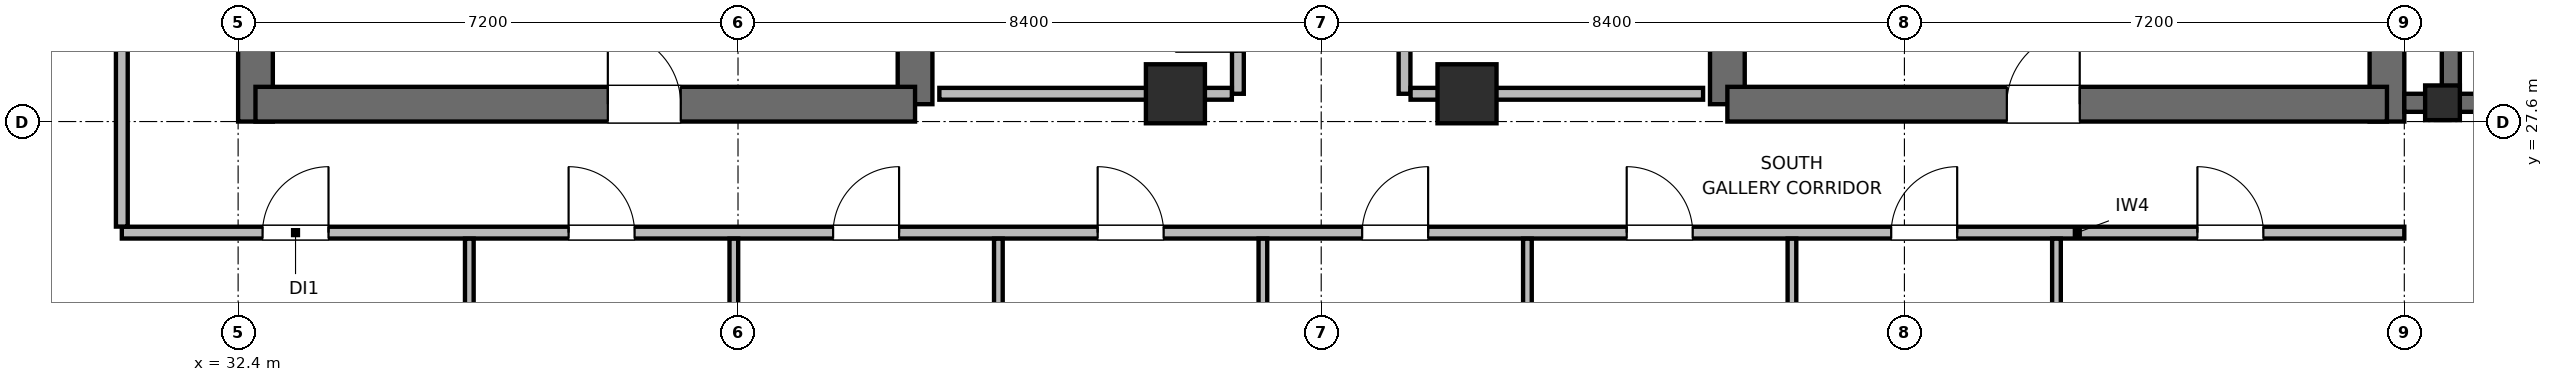
"""IFC4 building model, lengths in metres.
Left out: names, types, materials, properties, quantities, classifications, styles, units other than length and angle.
Written with IfcOpenShell. Run it as: python <this file> out.ifc"""

import sys

from ifc_helpers import new_model, si_unit, direction, frame, frame_2d, origin, origin_2d, place, context, subcontext, project, spatial, rectangle, hollow_rectangle, extrude, element, fill, save


model = new_model("IFC4")
c1 = context("Model", 3, precision=1e-05, world=origin(), true_north=direction((0.0, 1.0)))
c2 = subcontext(c1, "Body", "Model", "MODEL_VIEW")
j1 = project(units=[si_unit("LENGTHUNIT", "METRE"), si_unit("PLANEANGLEUNIT", "RADIAN")], contexts=[c1])
p1 = place(None, origin())
s1 = spatial("IfcSite", under=j1, at=p1, CompositionType="ELEMENT")
p2 = place(p1, origin())
s2 = spatial("IfcBuilding", under=s1, at=p2, CompositionType="ELEMENT")
p3 = place(p2, frame((0.0, 0.0, 350.4)))
s3 = spatial("IfcBuildingStorey", under=s2, at=p3, CompositionType="ELEMENT", Elevation=350.4)
p4 = place(p3, frame((32.65, 27.6, 0.0), z_axis=(0.0, 0.0, 1.0), x_axis=(0.0, 1.0, 0.0)))
e1 = element("IfcWall", 1, at=p4, inside=s3, PredefinedType="SHEAR", context=c2, shape_type="SweptSolid", body=[
    extrude(rectangle(XDim=16.8, YDim=0.5, at=frame_2d((8.4, 0.0))), origin(), (0.0, 0.0, 1.0), 4.5),
])
p5 = place(p3, frame((42.15, 27.85, 0.0), z_axis=(0.0, 0.0, 1.0), x_axis=(0.0, 1.0, 0.0)))
e2 = element("IfcWall", 2, at=p5, inside=s3, PredefinedType="SHEAR", context=c2, shape_type="SweptSolid", body=[
    extrude(rectangle(XDim=6.55, YDim=0.5, at=frame_2d((3.275, 0.0))), origin(), (0.0, 0.0, 1.0), 4.5),
])
p6 = place(p3, frame((32.65, 27.85, 0.0), z_axis=(0.0, 0.0, 1.0), x_axis=(1.0, 0.0, 0.0)))
e3 = element("IfcWall", 3, at=p6, inside=s3, PredefinedType="SHEAR", context=c2, shape_type="SweptSolid", body=[
    extrude(rectangle(XDim=9.5, YDim=0.5, at=frame_2d((4.75, 0.0))), origin(), (0.0, 0.0, 1.0), 4.5),
])
p7 = place(p6, frame((5.075, 0.0, 0.0)))
e4 = element("IfcOpeningElement", 4, at=p7, cuts=e3, PredefinedType="OPENING", context=c2, shape_type="SweptSolid", body=[
    extrude(rectangle(XDim=1.05, YDim=2.04, at=frame_2d((0.525, 1.02))), frame((0.0, 0.26, 0.0), z_axis=(0.0, -1.0, 0.0), x_axis=(1.0, 0.0, 0.0)), (0.0, 0.0, 1.0), 0.52),
])
p8 = place(p3, frame((53.85, 27.85, 0.0), z_axis=(0.0, 0.0, 1.0), x_axis=(0.0, 1.0, 0.0)))
e5 = element("IfcWall", 5, at=p8, inside=s3, PredefinedType="SHEAR", context=c2, shape_type="SweptSolid", body=[
    extrude(rectangle(XDim=7.95, YDim=0.5, at=frame_2d((3.975, 0.0))), origin(), (0.0, 0.0, 1.0), 4.5),
])
p9 = place(p3, frame((63.35, 27.6, 0.0), z_axis=(0.0, 0.0, 1.0), x_axis=(0.0, 1.0, 0.0)))
e6 = element("IfcWall", 6, at=p9, inside=s3, PredefinedType="SHEAR", context=c2, shape_type="SweptSolid", body=[
    extrude(rectangle(XDim=16.8, YDim=0.5, at=frame_2d((8.4, 0.0))), origin(), (0.0, 0.0, 1.0), 4.5),
])
p10 = place(p3, frame((53.85, 27.85, 0.0), z_axis=(0.0, 0.0, 1.0), x_axis=(1.0, 0.0, 0.0)))
e7 = element("IfcWall", 7, at=p10, inside=s3, PredefinedType="SHEAR", context=c2, shape_type="SweptSolid", body=[
    extrude(rectangle(XDim=9.5, YDim=0.5, at=frame_2d((4.75, 0.0))), origin(), (0.0, 0.0, 1.0), 4.5),
])
p11 = place(p10, frame((4.025, 0.0, 0.0)))
e8 = element("IfcOpeningElement", 8, at=p11, cuts=e7, PredefinedType="OPENING", context=c2, shape_type="SweptSolid", body=[
    extrude(rectangle(XDim=1.05, YDim=2.04, at=frame_2d((0.525, 1.02))), frame((0.0, 0.26, 0.0), z_axis=(0.0, -1.0, 0.0), x_axis=(1.0, 0.0, 0.0)), (0.0, 0.0, 1.0), 0.52),
])
p12 = place(p3, frame((63.6, 27.87, 0.0), z_axis=(0.0, 0.0, 1.0), x_axis=(1.0, 0.0, 0.0)))
e9 = element("IfcWall", 9, at=p12, inside=s3, PredefinedType="SHEAR", context=c2, shape_type="SweptSolid", body=[
    extrude(rectangle(XDim=4.06, YDim=0.26, at=frame_2d((2.03, 0.0))), origin(), (0.0, 0.0, 1.0), 4.5),
])
p13 = place(p12, frame((1.8, 0.0, 0.0)))
e10 = element("IfcOpeningElement", 10, at=p13, cuts=e9, PredefinedType="OPENING", context=c2, shape_type="SweptSolid", body=[
    extrude(rectangle(XDim=1.0, YDim=2.04, at=frame_2d((0.5, 1.02))), frame((0.0, 0.14, 0.0), z_axis=(0.0, -1.0, 0.0), x_axis=(1.0, 0.0, 0.0)), (0.0, 0.0, 1.0), 0.28),
])
p14 = place(p3, frame((64.27, 28.0, 0.0), z_axis=(0.0, 0.0, 1.0), x_axis=(0.0, 1.0, 0.0)))
e11 = element("IfcWall", 11, at=p14, inside=s3, PredefinedType="SHEAR", context=c2, shape_type="SweptSolid", body=[
    extrude(rectangle(XDim=7.45, YDim=0.26, at=frame_2d((3.725, 0.0))), origin(), (0.0, 0.0, 1.0), 4.5),
])
for number, where, z_axis, x_axis in (
    (12, (45.9, 28.0, 0.0), (0.0, 0.0, 1.0), (1.0, 0.0, 0.0)),
    (13, (50.1, 28.0, 0.0), (0.0, 0.0, 1.0), (1.0, 0.0, 0.0)),
):
    element("IfcColumn", number, at=place(p3, frame(where, z_axis=z_axis, x_axis=x_axis)), inside=s3, PredefinedType="COLUMN", context=c2, shape_type="SweptSolid", body=[
        extrude(rectangle(XDim=0.85, YDim=0.85, at=origin_2d()), origin(), (0.0, 0.0, 1.0), 4.5),
    ])
p15 = place(p3, frame((64.15, 27.87, 0.0), z_axis=(0.0, 0.0, 1.0), x_axis=(1.0, 0.0, 0.0)))
e14 = element("IfcColumn", 14, at=p15, inside=s3, PredefinedType="PILASTER", context=c2, shape_type="SweptSolid", body=[
    extrude(hollow_rectangle(XDim=0.5, YDim=0.5, WallThickness=0.025, at=origin_2d()), origin(), (0.0, 0.0, 1.0), 4.5),
])
p16 = place(p3, frame((46.8, 28.0, 0.0), z_axis=(0.0, 0.0, 1.0), x_axis=(0.0, 1.0, 0.0)))
e15 = element("IfcWall", 15, at=p16, inside=s3, PredefinedType="PARTITIONING", context=c2, shape_type="SweptSolid", body=[
    extrude(rectangle(XDim=4.5, YDim=0.17, at=frame_2d((2.25, 0.0))), origin(), (0.0, 0.0, 1.0), 4.2),
])
p17 = place(p16, frame((0.605, 0.0, 0.0)))
e16 = element("IfcOpeningElement", 16, at=p17, cuts=e15, PredefinedType="OPENING", context=c2, shape_type="SweptSolid", body=[
    extrude(rectangle(XDim=0.9, YDim=2.02, at=frame_2d((0.45, 1.01))), frame((0.0, 0.095, 0.0), z_axis=(0.0, -1.0, 0.0), x_axis=(1.0, 0.0, 0.0)), (0.0, 0.0, 1.0), 0.19),
])
p18 = place(p16, frame((2.655, 0.0, 0.0)))
e17 = element("IfcOpeningElement", 17, at=p18, cuts=e15, PredefinedType="OPENING", context=c2, shape_type="SweptSolid", body=[
    extrude(rectangle(XDim=0.9, YDim=2.02, at=frame_2d((0.45, 1.01))), frame((0.0, 0.095, 0.0), z_axis=(0.0, -1.0, 0.0), x_axis=(1.0, 0.0, 0.0)), (0.0, 0.0, 1.0), 0.19),
])
p19 = place(p3, frame((42.5, 28.0, 0.0), z_axis=(0.0, 0.0, 1.0), x_axis=(1.0, 0.0, 0.0)))
e18 = element("IfcWall", 18, at=p19, inside=s3, PredefinedType="PARTITIONING", context=c2, shape_type="SweptSolid", body=[
    extrude(rectangle(XDim=4.213, YDim=0.17, at=frame_2d((2.106, 0.0))), origin(), (0.0, 0.0, 1.0), 3.285),
])
p20 = place(p3, frame((49.2, 28.0, 0.0), z_axis=(0.0, 0.0, 1.0), x_axis=(0.0, 1.0, 0.0)))
e19 = element("IfcWall", 19, at=p20, inside=s3, PredefinedType="PARTITIONING", context=c2, shape_type="SweptSolid", body=[
    extrude(rectangle(XDim=4.5, YDim=0.17, at=frame_2d((2.25, 0.0))), origin(), (0.0, 0.0, 1.0), 4.2),
])
p21 = place(p20, frame((0.99, 0.0, 0.0)))
e20 = element("IfcOpeningElement", 20, at=p21, cuts=e19, PredefinedType="OPENING", context=c2, shape_type="SweptSolid", body=[
    extrude(rectangle(XDim=0.9, YDim=2.02, at=frame_2d((0.45, 1.01))), frame((0.0, 0.095, 0.0), z_axis=(0.0, -1.0, 0.0), x_axis=(1.0, 0.0, 0.0)), (0.0, 0.0, 1.0), 0.19),
])
p22 = place(p20, frame((3.24, 0.0, 0.0)))
e21 = element("IfcOpeningElement", 21, at=p22, cuts=e19, PredefinedType="OPENING", context=c2, shape_type="SweptSolid", body=[
    extrude(rectangle(XDim=0.9, YDim=2.02, at=frame_2d((0.45, 1.01))), frame((0.0, 0.095, 0.0), z_axis=(0.0, -1.0, 0.0), x_axis=(1.0, 0.0, 0.0)), (0.0, 0.0, 1.0), 0.19),
])
p23 = place(p3, frame((49.287, 28.0, 0.0), z_axis=(0.0, 0.0, 1.0), x_axis=(1.0, 0.0, 0.0)))
e22 = element("IfcWall", 22, at=p23, inside=s3, PredefinedType="PARTITIONING", context=c2, shape_type="SweptSolid", body=[
    extrude(rectangle(XDim=4.213, YDim=0.17, at=frame_2d((2.106, 0.0))), origin(), (0.0, 0.0, 1.0), 3.285),
])
p24 = place(p3, frame((30.725, 26.0, 0.0), z_axis=(0.0, 0.0, 1.0), x_axis=(1.0, 0.0, 0.0)))
e23 = element("IfcWall", 23, at=p24, inside=s3, PredefinedType="PARTITIONING", context=c2, shape_type="SweptSolid", body=[
    extrude(rectangle(XDim=32.875, YDim=0.17, at=frame_2d((16.438, 0.0))), origin(), (0.0, 0.0, 1.0), 4.2),
])
p25 = place(p24, frame((2.027, 0.0, 0.0)))
e24 = element("IfcOpeningElement", 24, at=p25, cuts=e23, PredefinedType="OPENING", context=c2, shape_type="SweptSolid", body=[
    extrude(rectangle(XDim=0.95, YDim=2.04, at=frame_2d((0.475, 1.02))), frame((0.0, 0.095, 0.0), z_axis=(0.0, -1.0, 0.0), x_axis=(1.0, 0.0, 0.0)), (0.0, 0.0, 1.0), 0.19),
])
p26 = place(p24, frame((6.435, 0.0, 0.0)))
e25 = element("IfcOpeningElement", 25, at=p26, cuts=e23, PredefinedType="OPENING", context=c2, shape_type="SweptSolid", body=[
    extrude(rectangle(XDim=0.95, YDim=2.04, at=frame_2d((0.475, 1.02))), frame((0.0, 0.095, 0.0), z_axis=(0.0, -1.0, 0.0), x_axis=(1.0, 0.0, 0.0)), (0.0, 0.0, 1.0), 0.19),
])
p27 = place(p24, frame((10.245, 0.0, 0.0)))
e26 = element("IfcOpeningElement", 26, at=p27, cuts=e23, PredefinedType="OPENING", context=c2, shape_type="SweptSolid", body=[
    extrude(rectangle(XDim=0.95, YDim=2.04, at=frame_2d((0.475, 1.02))), frame((0.0, 0.095, 0.0), z_axis=(0.0, -1.0, 0.0), x_axis=(1.0, 0.0, 0.0)), (0.0, 0.0, 1.0), 0.19),
])
p28 = place(p24, frame((14.055, 0.0, 0.0)))
e27 = element("IfcOpeningElement", 27, at=p28, cuts=e23, PredefinedType="OPENING", context=c2, shape_type="SweptSolid", body=[
    extrude(rectangle(XDim=0.95, YDim=2.04, at=frame_2d((0.475, 1.02))), frame((0.0, 0.095, 0.0), z_axis=(0.0, -1.0, 0.0), x_axis=(1.0, 0.0, 0.0)), (0.0, 0.0, 1.0), 0.19),
])
p29 = place(p24, frame((17.865, 0.0, 0.0)))
e28 = element("IfcOpeningElement", 28, at=p29, cuts=e23, PredefinedType="OPENING", context=c2, shape_type="SweptSolid", body=[
    extrude(rectangle(XDim=0.95, YDim=2.04, at=frame_2d((0.475, 1.02))), frame((0.0, 0.095, 0.0), z_axis=(0.0, -1.0, 0.0), x_axis=(1.0, 0.0, 0.0)), (0.0, 0.0, 1.0), 0.19),
])
p30 = place(p24, frame((21.675, 0.0, 0.0)))
e29 = element("IfcOpeningElement", 29, at=p30, cuts=e23, PredefinedType="OPENING", context=c2, shape_type="SweptSolid", body=[
    extrude(rectangle(XDim=0.95, YDim=2.04, at=frame_2d((0.475, 1.02))), frame((0.0, 0.095, 0.0), z_axis=(0.0, -1.0, 0.0), x_axis=(1.0, 0.0, 0.0)), (0.0, 0.0, 1.0), 0.19),
])
p31 = place(p24, frame((25.485, 0.0, 0.0)))
e30 = element("IfcOpeningElement", 30, at=p31, cuts=e23, PredefinedType="OPENING", context=c2, shape_type="SweptSolid", body=[
    extrude(rectangle(XDim=0.95, YDim=2.04, at=frame_2d((0.475, 1.02))), frame((0.0, 0.095, 0.0), z_axis=(0.0, -1.0, 0.0), x_axis=(1.0, 0.0, 0.0)), (0.0, 0.0, 1.0), 0.19),
])
p32 = place(p24, frame((29.895, 0.0, 0.0)))
e31 = element("IfcOpeningElement", 31, at=p32, cuts=e23, PredefinedType="OPENING", context=c2, shape_type="SweptSolid", body=[
    extrude(rectangle(XDim=0.95, YDim=2.04, at=frame_2d((0.475, 1.02))), frame((0.0, 0.095, 0.0), z_axis=(0.0, -1.0, 0.0), x_axis=(1.0, 0.0, 0.0)), (0.0, 0.0, 1.0), 0.19),
])
p33 = place(p3, frame((30.725, 26.087, 0.0), z_axis=(0.0, 0.0, 1.0), x_axis=(0.0, 1.0, 0.0)))
e32 = element("IfcWall", 32, at=p33, inside=s3, PredefinedType="PARTITIONING", context=c2, shape_type="SweptSolid", body=[
    extrude(rectangle(XDim=19.826, YDim=0.17, at=frame_2d((9.913, 0.0))), origin(), (0.0, 0.0, 1.0), 4.2),
])
p34 = place(p33, frame((4.038, 0.0, 0.0)))
e33 = element("IfcOpeningElement", 33, at=p34, cuts=e32, PredefinedType="OPENING", context=c2, shape_type="SweptSolid", body=[
    extrude(rectangle(XDim=0.95, YDim=2.04, at=frame_2d((0.475, 1.02))), frame((0.0, 0.095, 0.0), z_axis=(0.0, -1.0, 0.0), x_axis=(1.0, 0.0, 0.0)), (0.0, 0.0, 1.0), 0.19),
])
p35 = place(p33, frame((14.038, 0.0, 0.0)))
e34 = element("IfcOpeningElement", 34, at=p35, cuts=e32, PredefinedType="OPENING", context=c2, shape_type="SweptSolid", body=[
    extrude(rectangle(XDim=0.95, YDim=2.04, at=frame_2d((0.475, 1.02))), frame((0.0, 0.095, 0.0), z_axis=(0.0, -1.0, 0.0), x_axis=(1.0, 0.0, 0.0)), (0.0, 0.0, 1.0), 0.19),
])
p36 = place(p3, frame((35.73, 18.875, 0.0), z_axis=(0.0, 0.0, 1.0), x_axis=(0.0, 1.0, 0.0)))
e35 = element("IfcWall", 35, at=p36, inside=s3, PredefinedType="PARTITIONING", context=c2, shape_type="SweptSolid", body=[
    extrude(rectangle(XDim=7.038, YDim=0.125, at=frame_2d((3.519, 0.0))), origin(), (0.0, 0.0, 1.0), 4.2),
])
p37 = place(p3, frame((39.54, 18.875, 0.0), z_axis=(0.0, 0.0, 1.0), x_axis=(0.0, 1.0, 0.0)))
e36 = element("IfcWall", 36, at=p37, inside=s3, PredefinedType="PARTITIONING", context=c2, shape_type="SweptSolid", body=[
    extrude(rectangle(XDim=7.038, YDim=0.125, at=frame_2d((3.519, 0.0))), origin(), (0.0, 0.0, 1.0), 2.695),
])
p38 = place(p3, frame((43.35, 22.155, 0.0), z_axis=(0.0, 0.0, 1.0), x_axis=(0.0, 1.0, 0.0)))
e37 = element("IfcWall", 37, at=p38, inside=s3, PredefinedType="PARTITIONING", context=c2, shape_type="SweptSolid", body=[
    extrude(rectangle(XDim=3.758, YDim=0.125, at=frame_2d((1.879, 0.0))), origin(), (0.0, 0.0, 1.0), 3.523),
])
p39 = place(p3, frame((47.16, 21.9, 0.0), z_axis=(0.0, 0.0, 1.0), x_axis=(0.0, 1.0, 0.0)))
e38 = element("IfcWall", 38, at=p39, inside=s3, PredefinedType="PARTITIONING", context=c2, shape_type="SweptSolid", body=[
    extrude(rectangle(XDim=4.013, YDim=0.125, at=frame_2d((2.007, 0.0))), origin(), (0.0, 0.0, 1.0), 4.2),
])
p40 = place(p3, frame((50.97, 20.075, 0.0), z_axis=(0.0, 0.0, 1.0), x_axis=(0.0, 1.0, 0.0)))
e39 = element("IfcWall", 39, at=p40, inside=s3, PredefinedType="PARTITIONING", context=c2, shape_type="SweptSolid", body=[
    extrude(rectangle(XDim=5.838, YDim=0.125, at=frame_2d((2.919, 0.0))), origin(), (0.0, 0.0, 1.0), 4.2),
])
p41 = place(p3, frame((54.78, 18.875, 0.0), z_axis=(0.0, 0.0, 1.0), x_axis=(0.0, 1.0, 0.0)))
e40 = element("IfcWall", 40, at=p41, inside=s3, PredefinedType="PARTITIONING", context=c2, shape_type="SweptSolid", body=[
    extrude(rectangle(XDim=7.038, YDim=0.125, at=frame_2d((3.519, 0.0))), origin(), (0.0, 0.0, 1.0), 3.523),
])
p42 = place(p3, frame((58.59, 18.875, 0.0), z_axis=(0.0, 0.0, 1.0), x_axis=(0.0, 1.0, 0.0)))
e41 = element("IfcWall", 41, at=p42, inside=s3, PredefinedType="PARTITIONING", context=c2, shape_type="SweptSolid", body=[
    extrude(rectangle(XDim=7.038, YDim=0.125, at=frame_2d((3.519, 0.0))), origin(), (0.0, 0.0, 1.0), 4.2),
])
p43 = place(p7, origin())
e42 = element("IfcDoor", 42, at=p43, inside=s3, OperationType="SINGLE_SWING_LEFT", PredefinedType="DOOR", context=c2, shape_type="SweptSolid", body=[
    extrude(rectangle(XDim=1.05, YDim=2.04, at=frame_2d((0.525, 1.02))), frame((0.0, 0.025, 0.0), z_axis=(0.0, -1.0, 0.0), x_axis=(1.0, 0.0, 0.0)), (0.0, 0.0, 1.0), 0.05),
])
fill(e4, e42)
p44 = place(p11, origin())
e43 = element("IfcDoor", 43, at=p44, inside=s3, OperationType="SINGLE_SWING_RIGHT", PredefinedType="DOOR", context=c2, shape_type="SweptSolid", body=[
    extrude(rectangle(XDim=1.05, YDim=2.04, at=frame_2d((0.525, 1.02))), frame((0.0, 0.025, 0.0), z_axis=(0.0, -1.0, 0.0), x_axis=(1.0, 0.0, 0.0)), (0.0, 0.0, 1.0), 0.05),
])
fill(e8, e43)
p45 = place(p25, origin())
e44 = element("IfcDoor", 44, at=p45, inside=s3, OperationType="SINGLE_SWING_RIGHT", PredefinedType="DOOR", context=c2, shape_type="SweptSolid", body=[
    extrude(rectangle(XDim=0.95, YDim=2.04, at=frame_2d((0.475, 1.02))), frame((0.0, 0.025, 0.0), z_axis=(0.0, -1.0, 0.0), x_axis=(1.0, 0.0, 0.0)), (0.0, 0.0, 1.0), 0.05),
])
fill(e24, e44)
p46 = place(p26, origin())
e45 = element("IfcDoor", 45, at=p46, inside=s3, OperationType="SINGLE_SWING_LEFT", PredefinedType="DOOR", context=c2, shape_type="SweptSolid", body=[
    extrude(rectangle(XDim=0.95, YDim=2.04, at=frame_2d((0.475, 1.02))), frame((0.0, 0.025, 0.0), z_axis=(0.0, -1.0, 0.0), x_axis=(1.0, 0.0, 0.0)), (0.0, 0.0, 1.0), 0.05),
])
fill(e25, e45)
p47 = place(p27, origin())
e46 = element("IfcDoor", 46, at=p47, inside=s3, OperationType="SINGLE_SWING_RIGHT", PredefinedType="DOOR", context=c2, shape_type="SweptSolid", body=[
    extrude(rectangle(XDim=0.95, YDim=2.04, at=frame_2d((0.475, 1.02))), frame((0.0, 0.025, 0.0), z_axis=(0.0, -1.0, 0.0), x_axis=(1.0, 0.0, 0.0)), (0.0, 0.0, 1.0), 0.05),
])
fill(e26, e46)
p48 = place(p28, origin())
e47 = element("IfcDoor", 47, at=p48, inside=s3, OperationType="SINGLE_SWING_LEFT", PredefinedType="DOOR", context=c2, shape_type="SweptSolid", body=[
    extrude(rectangle(XDim=0.95, YDim=2.04, at=frame_2d((0.475, 1.02))), frame((0.0, 0.025, 0.0), z_axis=(0.0, -1.0, 0.0), x_axis=(1.0, 0.0, 0.0)), (0.0, 0.0, 1.0), 0.05),
])
fill(e27, e47)
p49 = place(p29, origin())
e48 = element("IfcDoor", 48, at=p49, inside=s3, OperationType="SINGLE_SWING_RIGHT", PredefinedType="DOOR", context=c2, shape_type="SweptSolid", body=[
    extrude(rectangle(XDim=0.95, YDim=2.04, at=frame_2d((0.475, 1.02))), frame((0.0, 0.025, 0.0), z_axis=(0.0, -1.0, 0.0), x_axis=(1.0, 0.0, 0.0)), (0.0, 0.0, 1.0), 0.05),
])
fill(e28, e48)
p50 = place(p30, origin())
e49 = element("IfcDoor", 49, at=p50, inside=s3, OperationType="SINGLE_SWING_LEFT", PredefinedType="DOOR", context=c2, shape_type="SweptSolid", body=[
    extrude(rectangle(XDim=0.95, YDim=2.04, at=frame_2d((0.475, 1.02))), frame((0.0, 0.025, 0.0), z_axis=(0.0, -1.0, 0.0), x_axis=(1.0, 0.0, 0.0)), (0.0, 0.0, 1.0), 0.05),
])
fill(e29, e49)
p51 = place(p31, origin())
e50 = element("IfcDoor", 50, at=p51, inside=s3, OperationType="SINGLE_SWING_RIGHT", PredefinedType="DOOR", context=c2, shape_type="SweptSolid", body=[
    extrude(rectangle(XDim=0.95, YDim=2.04, at=frame_2d((0.475, 1.02))), frame((0.0, 0.025, 0.0), z_axis=(0.0, -1.0, 0.0), x_axis=(1.0, 0.0, 0.0)), (0.0, 0.0, 1.0), 0.05),
])
fill(e30, e50)
p52 = place(p32, origin())
e51 = element("IfcDoor", 51, at=p52, inside=s3, OperationType="SINGLE_SWING_LEFT", PredefinedType="DOOR", context=c2, shape_type="SweptSolid", body=[
    extrude(rectangle(XDim=0.95, YDim=2.04, at=frame_2d((0.475, 1.02))), frame((0.0, 0.025, 0.0), z_axis=(0.0, -1.0, 0.0), x_axis=(1.0, 0.0, 0.0)), (0.0, 0.0, 1.0), 0.05),
])
fill(e31, e51)
save(model, sys.argv[1])
